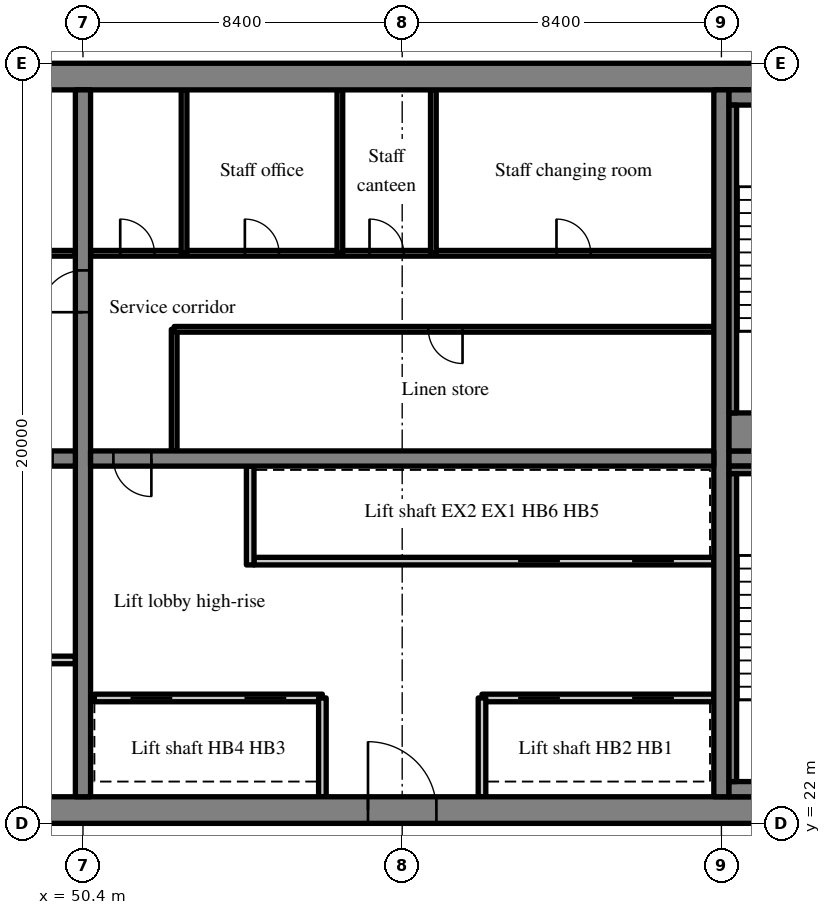
"""IFC4 building model, lengths in metres.
Left out: names, types, materials, properties, quantities, classifications, styles, units other than length and angle.
Written with IfcOpenShell. Run it as: python <this file> out.ifc"""

import sys

from ifc_helpers import new_model, si_unit, direction, frame, frame_2d, origin, place, context, subcontext, project, spatial, rectangle, extrude, source, transform, mapped, element, fill, save


model = new_model("IFC4")
c1 = context("Model", 3, precision=1e-05, world=origin(), true_north=direction((0.0, 1.0)))
c2 = subcontext(c1, "Body", "Model", "MODEL_VIEW")
j1 = project(units=[si_unit("LENGTHUNIT", "METRE"), si_unit("PLANEANGLEUNIT", "RADIAN")], contexts=[c1])
p1 = place(None, origin())
s1 = spatial("IfcSite", under=j1, at=p1, CompositionType="ELEMENT")
p2 = place(p1, origin())
s2 = spatial("IfcBuilding", under=s1, at=p2, CompositionType="ELEMENT")
p3 = place(p2, frame((0.0, 0.0, 178.2)))
s3 = spatial("IfcBuildingStorey", under=s2, at=p3, CompositionType="ELEMENT", Elevation=178.2)
m1 = source(origin(), c2, "Body", "SweptSolid", [
    extrude(rectangle(XDim=50.4, YDim=0.7, at=frame_2d((25.2, 0.0))), origin(), (0.0, 0.0, 1.0), 3.52),
])
p4 = place(p3, frame((25.2, 22.35, 0.0), z_axis=(0.0, 0.0, 1.0), x_axis=(1.0, 0.0, 0.0)))
e1 = element("IfcWall", 1, at=p4, inside=s3, PredefinedType="SHEAR", context=c2, shape_type="MappedRepresentation", body=[
    mapped(m1, transform((0.0, 0.0, 0.0), scale=1.0)),
])
m2 = source(origin(), c2, "Body", "SweptSolid", [
    extrude(rectangle(XDim=1.8, YDim=2.1, at=frame_2d((0.9, 1.05))), frame((0.0, 0.36, 0.0), z_axis=(0.0, -1.0, 0.0), x_axis=(1.0, 0.0, 0.0)), (0.0, 0.0, 1.0), 0.72),
])
p5 = place(p4, frame((15.9, 0.0, 0.0)))
e2 = element("IfcOpeningElement", 2, at=p5, cuts=e1, PredefinedType="OPENING", context=c2, shape_type="MappedRepresentation", body=[
    mapped(m2, transform((0.0, 0.0, 0.0), scale=1.0)),
])
m3 = source(origin(), c2, "Body", "SweptSolid", [
    extrude(rectangle(XDim=0.9, YDim=2.1, at=frame_2d((0.45, 1.05))), frame((0.0, 0.36, 0.0), z_axis=(0.0, -1.0, 0.0), x_axis=(1.0, 0.0, 0.0)), (0.0, 0.0, 1.0), 0.72),
])
p6 = place(p4, frame((11.2, 0.0, 0.0)))
e3 = element("IfcOpeningElement", 3, at=p6, cuts=e1, PredefinedType="OPENING", context=c2, shape_type="MappedRepresentation", body=[
    mapped(m3, transform((0.0, 0.0, 0.0), scale=1.0)),
])
p7 = place(p4, frame((21.5, 0.0, 0.0)))
e4 = element("IfcOpeningElement", 4, at=p7, cuts=e1, PredefinedType="OPENING", context=c2, shape_type="MappedRepresentation", body=[
    mapped(m3, transform((0.0, 0.0, 0.0), scale=1.0)),
])
p8 = place(p4, frame((32.7, 0.0, 0.0)))
e5 = element("IfcOpeningElement", 5, at=p8, cuts=e1, PredefinedType="OPENING", context=c2, shape_type="MappedRepresentation", body=[
    mapped(m2, transform((0.0, 0.0, 0.0), scale=1.0)),
])
m4 = source(origin(), c2, "Body", "SweptSolid", [
    extrude(rectangle(XDim=1.2, YDim=2.1, at=frame_2d((0.6, 1.05))), frame((0.0, 0.36, 0.0), z_axis=(0.0, -1.0, 0.0), x_axis=(1.0, 0.0, 0.0)), (0.0, 0.0, 1.0), 0.72),
])
p9 = place(p4, frame((6.475, 0.0, 0.0)))
e6 = element("IfcOpeningElement", 6, at=p9, cuts=e1, PredefinedType="OPENING", context=c2, shape_type="MappedRepresentation", body=[
    mapped(m4, transform((0.0, 0.0, 0.0), scale=1.0)),
])
p10 = place(p4, frame((47.875, 0.0, 0.0)))
e7 = element("IfcOpeningElement", 7, at=p10, cuts=e1, PredefinedType="OPENING", context=c2, shape_type="MappedRepresentation", body=[
    mapped(m4, transform((0.0, 0.0, 0.0), scale=1.0)),
])
p11 = place(p3, frame((25.2, 41.65, 0.0), z_axis=(0.0, 0.0, 1.0), x_axis=(1.0, 0.0, 0.0)))
e8 = element("IfcWall", 8, at=p11, inside=s3, PredefinedType="SHEAR", context=c2, shape_type="MappedRepresentation", body=[
    mapped(m1, transform((0.0, 0.0, 0.0), scale=1.0)),
])
m5 = source(origin(), c2, "Body", "SweptSolid", [
    extrude(rectangle(XDim=18.6, YDim=0.4, at=frame_2d((9.3, 0.0))), origin(), (0.0, 0.0, 1.0), 3.52),
])
p12 = place(p3, frame((50.4, 22.7, 0.0), z_axis=(0.0, 0.0, 1.0), x_axis=(0.0, 1.0, 0.0)))
e9 = element("IfcWall", 9, at=p12, inside=s3, PredefinedType="SHEAR", context=c2, shape_type="MappedRepresentation", body=[
    mapped(m5, transform((0.0, 0.0, 0.0), scale=1.0)),
])
m6 = source(origin(), c2, "Body", "SweptSolid", [
    extrude(rectangle(XDim=1.1, YDim=2.1, at=frame_2d((0.55, 1.05))), frame((0.0, 0.21, 0.0), z_axis=(0.0, -1.0, 0.0), x_axis=(1.0, 0.0, 0.0)), (0.0, 0.0, 1.0), 0.42),
])
p13 = place(p12, frame((12.75, 0.0, 0.0)))
e10 = element("IfcOpeningElement", 10, at=p13, cuts=e9, PredefinedType="OPENING", context=c2, shape_type="MappedRepresentation", body=[
    mapped(m6, transform((0.0, 0.0, 0.0), scale=1.0)),
])
p14 = place(p3, frame((67.2, 22.7, 0.0), z_axis=(0.0, 0.0, 1.0), x_axis=(0.0, 1.0, 0.0)))
e11 = element("IfcWall", 11, at=p14, inside=s3, PredefinedType="SHEAR", context=c2, shape_type="MappedRepresentation", body=[
    mapped(m5, transform((0.0, 0.0, 0.0), scale=1.0)),
])
m7 = source(origin(), c2, "Body", "SweptSolid", [
    extrude(rectangle(XDim=16.4, YDim=0.4, at=frame_2d((8.2, 0.0))), origin(), (0.0, 0.0, 1.0), 3.52),
])
p15 = place(p3, frame((33.8, 31.6, 0.0), z_axis=(0.0, 0.0, 1.0), x_axis=(1.0, 0.0, 0.0)))
e12 = element("IfcWall", 12, at=p15, inside=s3, PredefinedType="SHEAR", context=c2, shape_type="MappedRepresentation", body=[
    mapped(m7, transform((0.0, 0.0, 0.0), scale=1.0)),
])
m8 = source(origin(), c2, "Body", "SweptSolid", [
    extrude(rectangle(XDim=1.0, YDim=2.1, at=frame_2d((0.5, 1.05))), frame((0.0, 0.21, 0.0), z_axis=(0.0, -1.0, 0.0), x_axis=(1.0, 0.0, 0.0)), (0.0, 0.0, 1.0), 0.42),
])
p16 = place(p15, frame((14.8, 0.0, 0.0)))
e13 = element("IfcOpeningElement", 13, at=p16, cuts=e12, PredefinedType="OPENING", context=c2, shape_type="MappedRepresentation", body=[
    mapped(m8, transform((0.0, 0.0, 0.0), scale=1.0)),
])
p17 = place(p3, frame((50.6, 31.6, 0.0), z_axis=(0.0, 0.0, 1.0), x_axis=(1.0, 0.0, 0.0)))
e14 = element("IfcWall", 14, at=p17, inside=s3, PredefinedType="SHEAR", context=c2, shape_type="MappedRepresentation", body=[
    mapped(m7, transform((0.0, 0.0, 0.0), scale=1.0)),
])
p18 = place(p17, frame((0.6, 0.0, 0.0)))
e15 = element("IfcOpeningElement", 15, at=p18, cuts=e14, PredefinedType="OPENING", context=c2, shape_type="MappedRepresentation", body=[
    mapped(m8, transform((0.0, 0.0, 0.0), scale=1.0)),
])
m9 = source(origin(), c2, "Body", "SweptSolid", [
    extrude(rectangle(XDim=7.5, YDim=0.4, at=frame_2d((3.75, 0.0))), origin(), (0.0, 0.0, 1.0), 3.52),
])
p19 = place(p3, frame((67.4, 31.6, 0.0), z_axis=(0.0, 0.0, 1.0), x_axis=(1.0, 0.0, 0.0)))
e16 = element("IfcWall", 16, at=p19, inside=s3, PredefinedType="SHEAR", context=c2, shape_type="MappedRepresentation", body=[
    mapped(m9, transform((0.0, 0.0, 0.0), scale=1.0)),
])
p20 = place(p19, frame((5.725, 0.0, 0.0)))
e17 = element("IfcOpeningElement", 17, at=p20, cuts=e16, PredefinedType="OPENING", context=c2, shape_type="MappedRepresentation", body=[
    mapped(m6, transform((0.0, 0.0, 0.0), scale=1.0)),
])
m10 = source(origin(), c2, "Body", "SweptSolid", [
    extrude(rectangle(XDim=6.1, YDim=0.2, at=frame_2d((3.05, 0.0))), origin(), (0.0, 0.0, 1.0), 3.52),
])
p21 = place(p3, frame((44.1, 26.3, 0.0), z_axis=(0.0, 0.0, 1.0), x_axis=(1.0, 0.0, 0.0)))
e18 = element("IfcWall", 18, at=p21, inside=s3, PredefinedType="PARTITIONING", context=c2, shape_type="MappedRepresentation", body=[
    mapped(m10, transform((0.0, 0.0, 0.0), scale=1.0)),
])
m11 = source(origin(), c2, "Body", "SweptSolid", [
    extrude(rectangle(XDim=16.4, YDim=0.15, at=frame_2d((8.2, 0.0))), origin(), (0.0, 0.0, 1.0), 3.52),
])
p22 = place(p3, frame((33.8, 37.0, 0.0), z_axis=(0.0, 0.0, 1.0), x_axis=(1.0, 0.0, 0.0)))
e19 = element("IfcWall", 19, at=p22, inside=s3, PredefinedType="PARTITIONING", context=c2, shape_type="MappedRepresentation", body=[
    mapped(m11, transform((0.0, 0.0, 0.0), scale=1.0)),
])
m12 = source(origin(), c2, "Body", "SweptSolid", [
    extrude(rectangle(XDim=0.9, YDim=2.1, at=frame_2d((0.45, 1.05))), frame((0.0, 0.085, 0.0), z_axis=(0.0, -1.0, 0.0), x_axis=(1.0, 0.0, 0.0)), (0.0, 0.0, 1.0), 0.17),
])
p23 = place(p22, frame((1.6, 0.0, 0.0)))
e20 = element("IfcOpeningElement", 20, at=p23, cuts=e19, PredefinedType="OPENING", context=c2, shape_type="MappedRepresentation", body=[
    mapped(m12, transform((0.0, 0.0, 0.0), scale=1.0)),
])
p24 = place(p22, frame((7.34, 0.0, 0.0)))
e21 = element("IfcOpeningElement", 21, at=p24, cuts=e19, PredefinedType="OPENING", context=c2, shape_type="MappedRepresentation", body=[
    mapped(m12, transform((0.0, 0.0, 0.0), scale=1.0)),
])
p25 = place(p22, frame((12.26, 0.0, 0.0)))
e22 = element("IfcOpeningElement", 22, at=p25, cuts=e19, PredefinedType="OPENING", context=c2, shape_type="MappedRepresentation", body=[
    mapped(m12, transform((0.0, 0.0, 0.0), scale=1.0)),
])
p26 = place(p22, frame((14.72, 0.0, 0.0)))
e23 = element("IfcOpeningElement", 23, at=p26, cuts=e19, PredefinedType="OPENING", context=c2, shape_type="MappedRepresentation", body=[
    mapped(m12, transform((0.0, 0.0, 0.0), scale=1.0)),
])
m13 = source(origin(), c2, "Body", "SweptSolid", [
    extrude(rectangle(XDim=6.1, YDim=0.2, at=frame_2d((3.05, 0.0))), origin(), (0.0, 0.0, 1.0), 3.52),
])
p27 = place(p3, frame((67.0, 25.3, 0.0), z_axis=(0.0, 0.0, 1.0), x_axis=(-1.0, 0.0, 0.0)))
e24 = element("IfcWall", 24, at=p27, inside=s3, PredefinedType="SOLIDWALL", context=c2, shape_type="MappedRepresentation", body=[
    mapped(m13, transform((0.0, 0.0, 0.0), scale=1.0)),
])
m14 = source(origin(), c2, "Body", "SweptSolid", [
    extrude(rectangle(XDim=1.1, YDim=2.1, at=frame_2d((0.55, 1.05))), frame((0.0, 0.11, 0.0), z_axis=(0.0, -1.0, 0.0), x_axis=(1.0, 0.0, 0.0)), (0.0, 0.0, 1.0), 0.22),
])
p28 = place(p27, frame((1.05, 0.0, 0.0)))
e25 = element("IfcOpeningElement", 25, at=p28, cuts=e24, PredefinedType="OPENING", context=c2, shape_type="MappedRepresentation", body=[
    mapped(m14, transform((0.0, 0.0, 0.0), scale=1.0)),
])
p29 = place(p27, frame((4.05, 0.0, 0.0)))
e26 = element("IfcOpeningElement", 26, at=p29, cuts=e24, PredefinedType="OPENING", context=c2, shape_type="MappedRepresentation", body=[
    mapped(m14, transform((0.0, 0.0, 0.0), scale=1.0)),
])
m15 = source(origin(), c2, "Body", "SweptSolid", [
    extrude(rectangle(XDim=6.0, YDim=0.2, at=frame_2d((3.0, 0.0))), origin(), (0.0, 0.0, 1.0), 3.52),
])
p30 = place(p3, frame((56.7, 25.3, 0.0), z_axis=(0.0, 0.0, 1.0), x_axis=(-1.0, 0.0, 0.0)))
e27 = element("IfcWall", 27, at=p30, inside=s3, PredefinedType="SOLIDWALL", context=c2, shape_type="MappedRepresentation", body=[
    mapped(m15, transform((0.0, 0.0, 0.0), scale=1.0)),
])
p31 = place(p30, frame((0.95, 0.0, 0.0)))
e28 = element("IfcOpeningElement", 28, at=p31, cuts=e27, PredefinedType="OPENING", context=c2, shape_type="MappedRepresentation", body=[
    mapped(m14, transform((0.0, 0.0, 0.0), scale=1.0)),
])
p32 = place(p30, frame((3.95, 0.0, 0.0)))
e29 = element("IfcOpeningElement", 29, at=p32, cuts=e27, PredefinedType="OPENING", context=c2, shape_type="MappedRepresentation", body=[
    mapped(m14, transform((0.0, 0.0, 0.0), scale=1.0)),
])
m16 = source(origin(), c2, "Body", "SweptSolid", [
    extrude(rectangle(XDim=12.1, YDim=0.2, at=frame_2d((6.05, 0.0))), origin(), (0.0, 0.0, 1.0), 3.52),
])
p33 = place(p3, frame((67.0, 28.9, 0.0), z_axis=(0.0, 0.0, 1.0), x_axis=(-1.0, 0.0, 0.0)))
e30 = element("IfcWall", 30, at=p33, inside=s3, PredefinedType="SOLIDWALL", context=c2, shape_type="MappedRepresentation", body=[
    mapped(m16, transform((0.0, 0.0, 0.0), scale=1.0)),
])
p34 = place(p33, frame((1.05, 0.0, 0.0)))
e31 = element("IfcOpeningElement", 31, at=p34, cuts=e30, PredefinedType="OPENING", context=c2, shape_type="MappedRepresentation", body=[
    mapped(m14, transform((0.0, 0.0, 0.0), scale=1.0)),
])
p35 = place(p33, frame((4.05, 0.0, 0.0)))
e32 = element("IfcOpeningElement", 32, at=p35, cuts=e30, PredefinedType="OPENING", context=c2, shape_type="MappedRepresentation", body=[
    mapped(m14, transform((0.0, 0.0, 0.0), scale=1.0)),
])
m17 = source(origin(), c2, "Body", "SweptSolid", [
    extrude(rectangle(XDim=2.6, YDim=0.2, at=frame_2d((1.3, 0.0))), origin(), (0.0, 0.0, 1.0), 3.52),
])
for number, where, z_axis, x_axis in (
    (33, (60.9, 22.7, 0.0), (0.0, 0.0, 1.0), (0.0, 1.0, 0.0)),
    (34, (56.7, 22.7, 0.0), (0.0, 0.0, 1.0), (0.0, 1.0, 0.0)),
):
    element("IfcWall", number, at=place(p3, frame(where, z_axis=z_axis, x_axis=x_axis)), inside=s3, PredefinedType="SOLIDWALL", context=c2, shape_type="MappedRepresentation", body=[
        mapped(m17, transform((0.0, 0.0, 0.0), scale=1.0)),
    ])
m18 = source(origin(), c2, "Body", "SweptSolid", [
    extrude(rectangle(XDim=2.6, YDim=0.2, at=frame_2d((1.3, 0.0))), origin(), (0.0, 0.0, 1.0), 3.52),
])
p36 = place(p3, frame((54.8, 28.8, 0.0), z_axis=(0.0, 0.0, 1.0), x_axis=(0.0, 1.0, 0.0)))
e35 = element("IfcWall", 35, at=p36, inside=s3, PredefinedType="SOLIDWALL", context=c2, shape_type="MappedRepresentation", body=[
    mapped(m18, transform((0.0, 0.0, 0.0), scale=1.0)),
])
m19 = source(origin(), c2, "Body", "SweptSolid", [
    extrude(rectangle(XDim=3.2, YDim=0.15, at=frame_2d((1.6, 0.0))), origin(), (0.0, 0.0, 1.0), 3.52),
])
p37 = place(p3, frame((52.8, 31.8, 0.0), z_axis=(0.0, 0.0, 1.0), x_axis=(0.0, 1.0, 0.0)))
e36 = element("IfcWall", 36, at=p37, inside=s3, PredefinedType="PARTITIONING", context=c2, shape_type="MappedRepresentation", body=[
    mapped(m19, transform((0.0, 0.0, 0.0), scale=1.0)),
])
m20 = source(origin(), c2, "Body", "SweptSolid", [
    extrude(rectangle(XDim=14.2, YDim=0.15, at=frame_2d((7.1, 0.0))), origin(), (0.0, 0.0, 1.0), 3.52),
])
p38 = place(p3, frame((67.0, 35.0, 0.0), z_axis=(0.0, 0.0, 1.0), x_axis=(-1.0, 0.0, 0.0)))
e37 = element("IfcWall", 37, at=p38, inside=s3, PredefinedType="PARTITIONING", context=c2, shape_type="MappedRepresentation", body=[
    mapped(m20, transform((0.0, 0.0, 0.0), scale=1.0)),
])
p39 = place(p38, frame((6.612, 0.0, 0.0)))
e38 = element("IfcOpeningElement", 38, at=p39, cuts=e37, PredefinedType="OPENING", context=c2, shape_type="MappedRepresentation", body=[
    mapped(m12, transform((0.0, 0.0, 0.0), scale=1.0)),
])
p40 = place(p3, frame((67.0, 37.0, 0.0), z_axis=(0.0, 0.0, 1.0), x_axis=(-1.0, 0.0, 0.0)))
e39 = element("IfcWall", 39, at=p40, inside=s3, PredefinedType="PARTITIONING", context=c2, shape_type="MappedRepresentation", body=[
    mapped(m11, transform((0.0, 0.0, 0.0), scale=1.0)),
])
p41 = place(p40, frame((3.24, 0.0, 0.0)))
e40 = element("IfcOpeningElement", 40, at=p41, cuts=e39, PredefinedType="OPENING", context=c2, shape_type="MappedRepresentation", body=[
    mapped(m12, transform((0.0, 0.0, 0.0), scale=1.0)),
])
p42 = place(p40, frame((8.16, 0.0, 0.0)))
e41 = element("IfcOpeningElement", 41, at=p42, cuts=e39, PredefinedType="OPENING", context=c2, shape_type="MappedRepresentation", body=[
    mapped(m12, transform((0.0, 0.0, 0.0), scale=1.0)),
])
p43 = place(p40, frame((11.44, 0.0, 0.0)))
e42 = element("IfcOpeningElement", 42, at=p43, cuts=e39, PredefinedType="OPENING", context=c2, shape_type="MappedRepresentation", body=[
    mapped(m12, transform((0.0, 0.0, 0.0), scale=1.0)),
])
p44 = place(p40, frame((14.72, 0.0, 0.0)))
e43 = element("IfcOpeningElement", 43, at=p44, cuts=e39, PredefinedType="OPENING", context=c2, shape_type="MappedRepresentation", body=[
    mapped(m12, transform((0.0, 0.0, 0.0), scale=1.0)),
])
m21 = source(origin(), c2, "Body", "SweptSolid", [
    extrude(rectangle(XDim=4.3, YDim=0.15, at=frame_2d((2.15, 0.0))), origin(), (0.0, 0.0, 1.0), 3.52),
])
for number, where, z_axis, x_axis in (
    (44, (59.62, 37.0, 0.0), (0.0, 0.0, 1.0), (0.0, 1.0, 0.0)),
    (45, (57.16, 37.0, 0.0), (0.0, 0.0, 1.0), (0.0, 1.0, 0.0)),
    (46, (53.06, 37.0, 0.0), (0.0, 0.0, 1.0), (0.0, 1.0, 0.0)),
):
    element("IfcWall", number, at=place(p3, frame(where, z_axis=z_axis, x_axis=x_axis)), inside=s3, PredefinedType="PARTITIONING", context=c2, shape_type="MappedRepresentation", body=[
        mapped(m21, transform((0.0, 0.0, 0.0), scale=1.0)),
    ])
m22 = source(origin(), c2, "Body", "SweptSolid", [
    extrude(rectangle(XDim=4.85, YDim=0.4, at=frame_2d((2.425, 0.0))), origin(), (0.0, 0.0, 1.0), 3.52),
])
p45 = place(p3, frame((67.4, 22.9, 0.0), z_axis=(0.0, 0.0, 1.0), x_axis=(1.0, 0.0, 0.0)))
e47 = element("IfcWall", 47, at=p45, inside=s3, PredefinedType="SOLIDWALL", context=c2, shape_type="MappedRepresentation", body=[
    mapped(m22, transform((0.0, 0.0, 0.0), scale=1.0)),
])
m23 = source(origin(), c2, "Body", "SweptSolid", [
    extrude(rectangle(XDim=4.85, YDim=0.2, at=frame_2d((2.425, 0.0))), origin(), (0.0, 0.0, 1.0), 3.52),
])
p46 = place(p3, frame((67.4, 31.3, 0.0), z_axis=(0.0, 0.0, 1.0), x_axis=(1.0, 0.0, 0.0)))
e48 = element("IfcWall", 48, at=p46, inside=s3, PredefinedType="SOLIDWALL", context=c2, shape_type="MappedRepresentation", body=[
    mapped(m23, transform((0.0, 0.0, 0.0), scale=1.0)),
])
m24 = source(origin(), c2, "Body", "SweptSolid", [
    extrude(rectangle(XDim=8.1, YDim=0.2, at=frame_2d((4.05, 0.0))), origin(), (0.0, 0.0, 1.0), 3.52),
])
p47 = place(p3, frame((67.5, 23.1, 0.0), z_axis=(0.0, 0.0, 1.0), x_axis=(0.0, 1.0, 0.0)))
e49 = element("IfcWall", 49, at=p47, inside=s3, PredefinedType="SOLIDWALL", context=c2, shape_type="MappedRepresentation", body=[
    mapped(m24, transform((0.0, 0.0, 0.0), scale=1.0)),
])
p48 = place(p3, frame((67.4, 41.1, 0.0), z_axis=(0.0, 0.0, 1.0), x_axis=(1.0, 0.0, 0.0)))
e50 = element("IfcWall", 50, at=p48, inside=s3, PredefinedType="SOLIDWALL", context=c2, shape_type="MappedRepresentation", body=[
    mapped(m22, transform((0.0, 0.0, 0.0), scale=1.0)),
])
m25 = source(origin(), c2, "Body", "SweptSolid", [
    extrude(rectangle(XDim=4.85, YDim=1.0, at=frame_2d((2.425, 0.0))), origin(), (0.0, 0.0, 1.0), 3.52),
])
p49 = place(p3, frame((67.4, 32.3, 0.0), z_axis=(0.0, 0.0, 1.0), x_axis=(1.0, 0.0, 0.0)))
e51 = element("IfcWall", 51, at=p49, inside=s3, PredefinedType="SOLIDWALL", context=c2, shape_type="MappedRepresentation", body=[
    mapped(m25, transform((0.0, 0.0, 0.0), scale=1.0)),
])
p50 = place(p3, frame((67.5, 32.8, 0.0), z_axis=(0.0, 0.0, 1.0), x_axis=(0.0, 1.0, 0.0)))
e52 = element("IfcWall", 52, at=p50, inside=s3, PredefinedType="SOLIDWALL", context=c2, shape_type="MappedRepresentation", body=[
    mapped(m24, transform((0.0, 0.0, 0.0), scale=1.0)),
])
m26 = source(origin(), c2, "Body", "SweptSolid", [
    extrude(rectangle(XDim=1.8, YDim=2.1, at=frame_2d((0.9, 1.05))), frame((0.0, 0.275, 0.0), z_axis=(0.0, -1.0, 0.0), x_axis=(1.0, 0.0, 0.0)), (0.0, 0.0, 1.0), 0.05),
])
p51 = place(p8, origin())
e53 = element("IfcDoor", 53, at=p51, inside=s3, OperationType="DOUBLE_DOOR_SINGLE_SWING", PredefinedType="DOOR", context=c2, shape_type="MappedRepresentation", body=[
    mapped(m26, transform((0.0, 0.0, 0.0), scale=1.0)),
])
fill(e5, e53)
m27 = source(origin(), c2, "Body", "SweptSolid", [
    extrude(rectangle(XDim=1.0, YDim=2.1, at=frame_2d((0.5, 1.05))), frame((0.0, 0.025, 0.0), z_axis=(0.0, -1.0, 0.0), x_axis=(1.0, 0.0, 0.0)), (0.0, 0.0, 1.0), 0.05),
])
p52 = place(p18, origin())
e54 = element("IfcDoor", 54, at=p52, inside=s3, OperationType="SINGLE_SWING_RIGHT", PredefinedType="DOOR", context=c2, shape_type="MappedRepresentation", body=[
    mapped(m27, transform((0.0, 0.0, 0.0), scale=1.0)),
])
fill(e15, e54)
m28 = source(origin(), c2, "Body", "SweptSolid", [
    extrude(rectangle(XDim=1.1, YDim=2.1, at=frame_2d((0.55, 1.05))), frame((0.0, 0.025, 0.0), z_axis=(0.0, -1.0, 0.0), x_axis=(1.0, 0.0, 0.0)), (0.0, 0.0, 1.0), 0.05),
])
p53 = place(p28, origin())
e55 = element("IfcDoor", 55, at=p53, inside=s3, OperationType="SLIDING_TO_RIGHT", PredefinedType="DOOR", context=c2, shape_type="MappedRepresentation", body=[
    mapped(m28, transform((0.0, 0.0, 0.0), scale=1.0)),
])
fill(e25, e55)
p54 = place(p29, origin())
e56 = element("IfcDoor", 56, at=p54, inside=s3, OperationType="SLIDING_TO_LEFT", PredefinedType="DOOR", context=c2, shape_type="MappedRepresentation", body=[
    mapped(m28, transform((0.0, 0.0, 0.0), scale=1.0)),
])
fill(e26, e56)
p55 = place(p31, origin())
e57 = element("IfcDoor", 57, at=p55, inside=s3, OperationType="SLIDING_TO_RIGHT", PredefinedType="DOOR", context=c2, shape_type="MappedRepresentation", body=[
    mapped(m28, transform((0.0, 0.0, 0.0), scale=1.0)),
])
fill(e28, e57)
p56 = place(p32, origin())
e58 = element("IfcDoor", 58, at=p56, inside=s3, OperationType="SLIDING_TO_LEFT", PredefinedType="DOOR", context=c2, shape_type="MappedRepresentation", body=[
    mapped(m28, transform((0.0, 0.0, 0.0), scale=1.0)),
])
fill(e29, e58)
p57 = place(p34, origin())
e59 = element("IfcDoor", 59, at=p57, inside=s3, OperationType="SLIDING_TO_RIGHT", PredefinedType="DOOR", context=c2, shape_type="MappedRepresentation", body=[
    mapped(m28, transform((0.0, 0.0, 0.0), scale=1.0)),
])
fill(e31, e59)
p58 = place(p35, origin())
e60 = element("IfcDoor", 60, at=p58, inside=s3, OperationType="SLIDING_TO_LEFT", PredefinedType="DOOR", context=c2, shape_type="MappedRepresentation", body=[
    mapped(m28, transform((0.0, 0.0, 0.0), scale=1.0)),
])
fill(e32, e60)
m29 = source(origin(), c2, "Body", "SweptSolid", [
    extrude(rectangle(XDim=0.9, YDim=2.1, at=frame_2d((0.45, 1.05))), frame((0.0, 0.025, 0.0), z_axis=(0.0, -1.0, 0.0), x_axis=(1.0, 0.0, 0.0)), (0.0, 0.0, 1.0), 0.05),
])
p59 = place(p39, origin())
e61 = element("IfcDoor", 61, at=p59, inside=s3, OperationType="SINGLE_SWING_LEFT", PredefinedType="DOOR", context=c2, shape_type="MappedRepresentation", body=[
    mapped(m29, transform((0.0, 0.0, 0.0), scale=1.0)),
])
fill(e38, e61)
p60 = place(p41, origin())
e62 = element("IfcDoor", 62, at=p60, inside=s3, OperationType="SINGLE_SWING_RIGHT", PredefinedType="DOOR", context=c2, shape_type="MappedRepresentation", body=[
    mapped(m29, transform((0.0, 0.0, 0.0), scale=1.0)),
])
fill(e40, e62)
p61 = place(p42, origin())
e63 = element("IfcDoor", 63, at=p61, inside=s3, OperationType="SINGLE_SWING_RIGHT", PredefinedType="DOOR", context=c2, shape_type="MappedRepresentation", body=[
    mapped(m29, transform((0.0, 0.0, 0.0), scale=1.0)),
])
fill(e41, e63)
p62 = place(p43, origin())
e64 = element("IfcDoor", 64, at=p62, inside=s3, OperationType="SINGLE_SWING_RIGHT", PredefinedType="DOOR", context=c2, shape_type="MappedRepresentation", body=[
    mapped(m29, transform((0.0, 0.0, 0.0), scale=1.0)),
])
fill(e42, e64)
p63 = place(p44, origin())
e65 = element("IfcDoor", 65, at=p63, inside=s3, OperationType="SINGLE_SWING_RIGHT", PredefinedType="DOOR", context=c2, shape_type="MappedRepresentation", body=[
    mapped(m29, transform((0.0, 0.0, 0.0), scale=1.0)),
])
fill(e43, e65)
p64 = place(p13, origin())
e66 = element("IfcDoor", 66, at=p64, inside=s3, OperationType="SINGLE_SWING_LEFT", PredefinedType="DOOR", context=c2, shape_type="MappedRepresentation", body=[
    mapped(m28, transform((0.0, 0.0, 0.0), scale=1.0)),
])
fill(e10, e66)
save(model, sys.argv[1])
